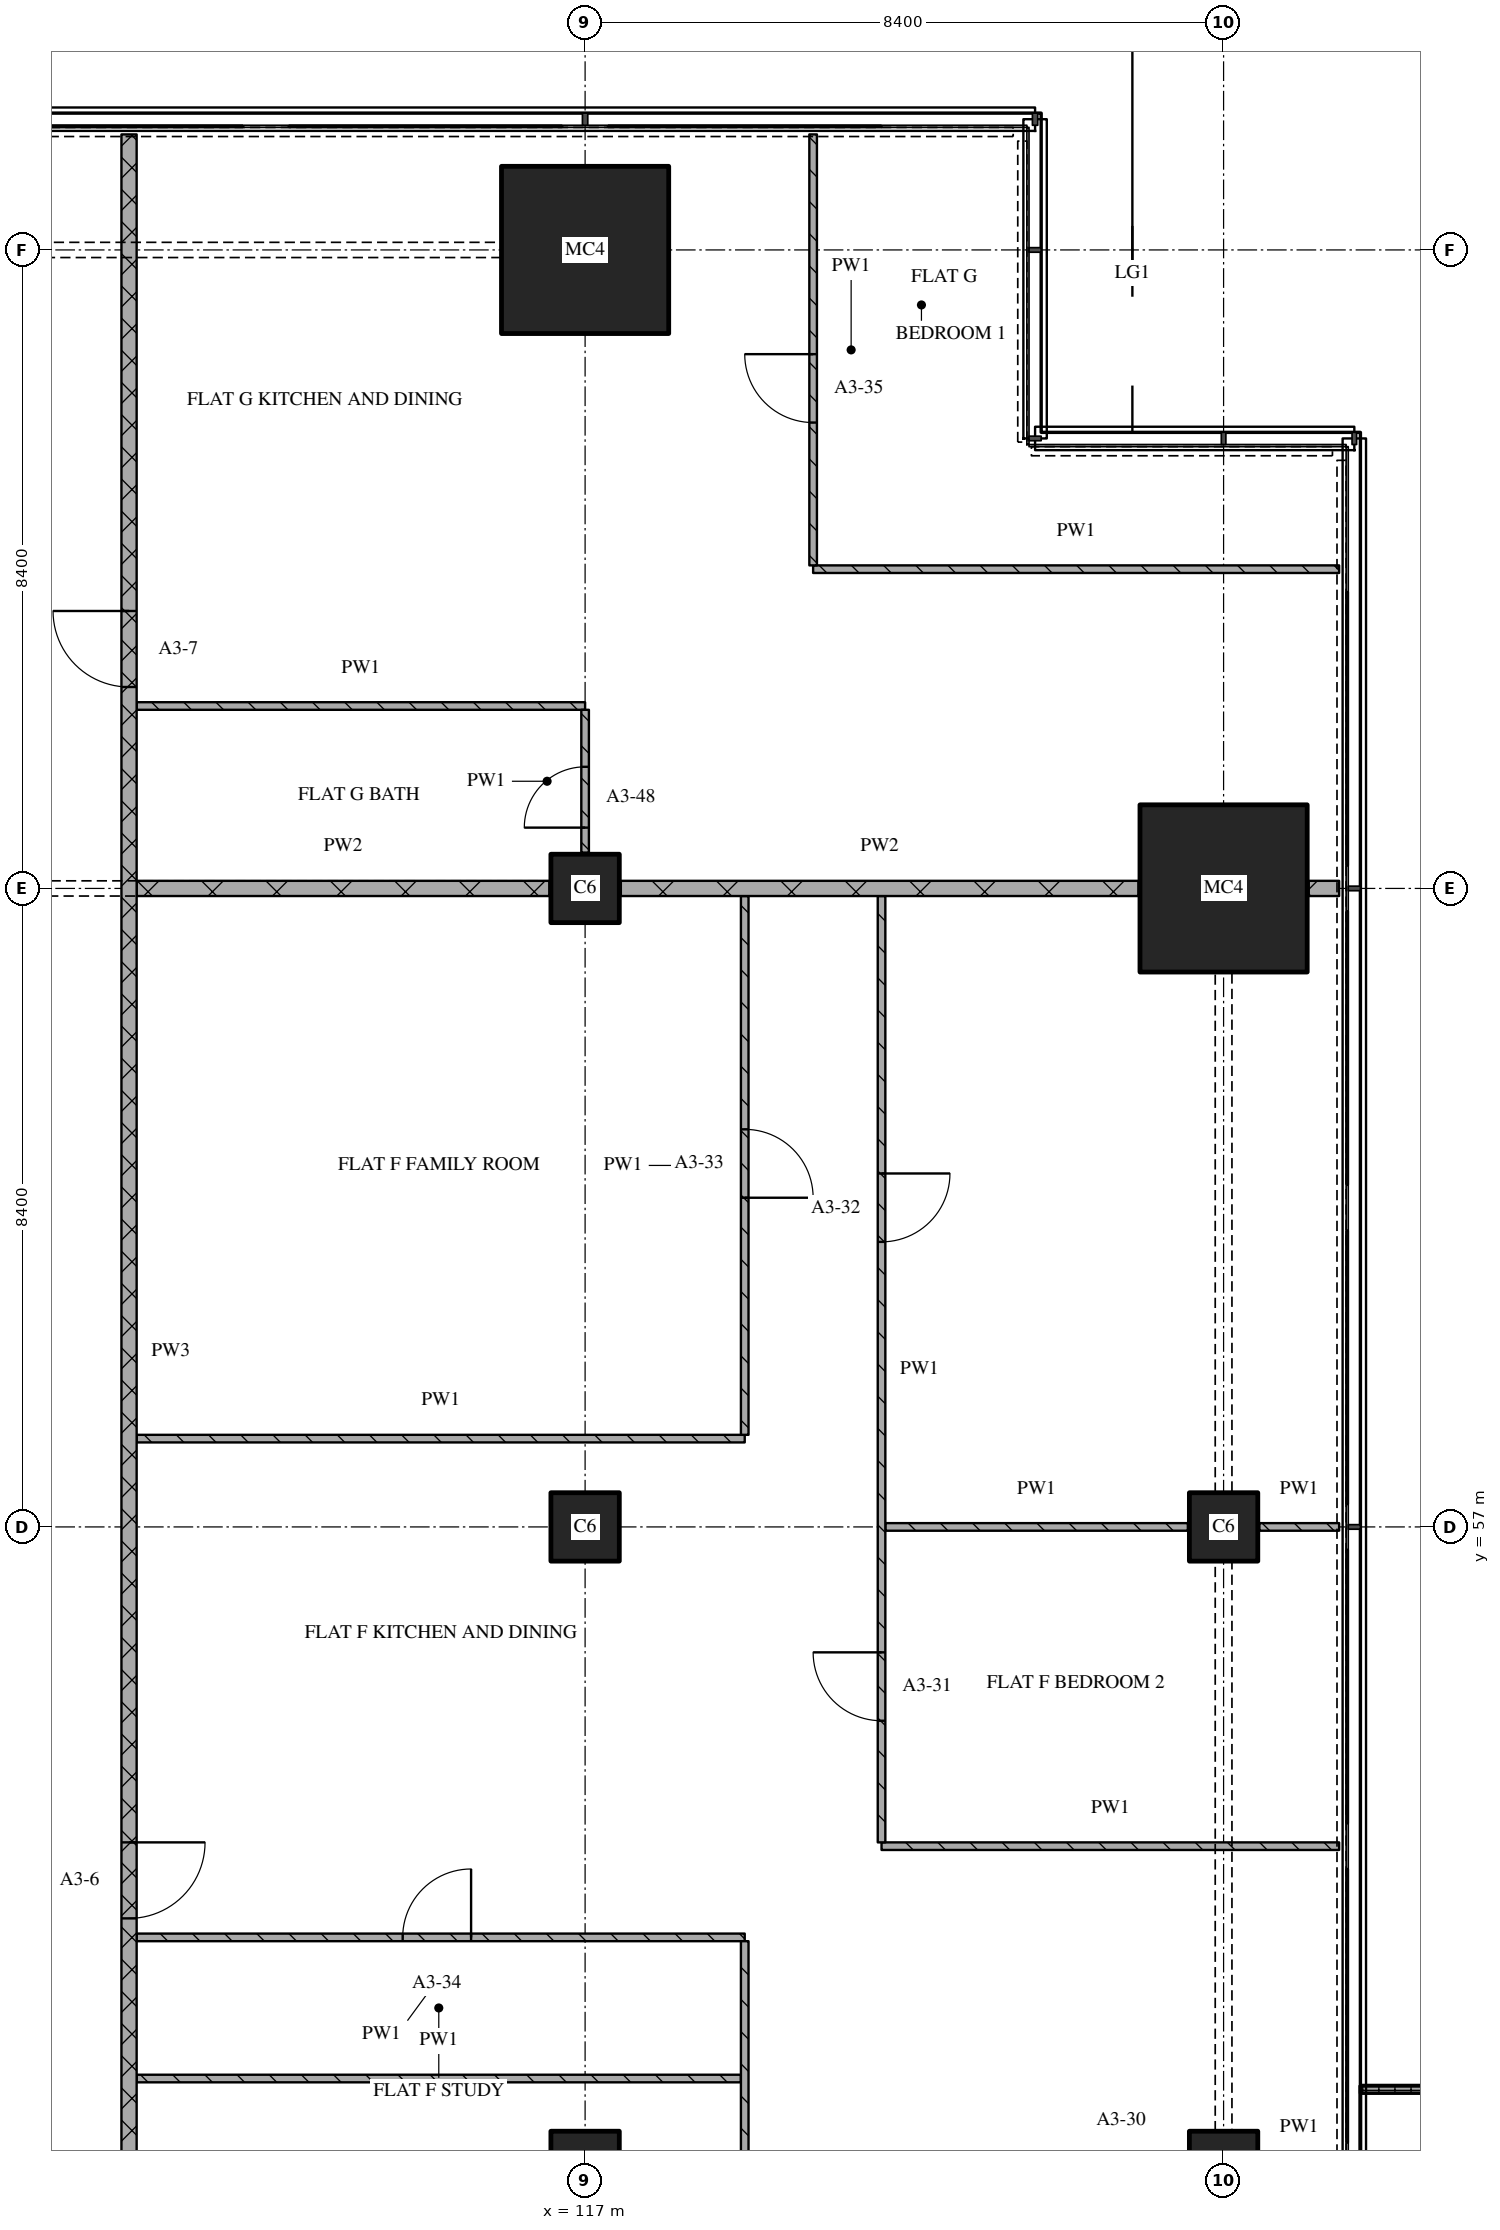
"""IFC4 building model, lengths in metres.
Left out: names, types, materials, properties, quantities, classifications, styles, units other than length and angle.
Written with IfcOpenShell. Run it as: python <this file> out.ifc"""

import sys

from ifc_helpers import new_model, si_unit, direction, frame, frame_2d, origin, origin_2d, place, context, subcontext, project, spatial, polyline, rectangle, outline, extrude, element, fill, save


model = new_model("IFC4")
c1 = context("Model", 3, precision=1e-05, world=origin(), true_north=direction((0.0, 1.0)))
c2 = subcontext(c1, "Body", "Model", "MODEL_VIEW")
j1 = project(units=[si_unit("LENGTHUNIT", "METRE"), si_unit("PLANEANGLEUNIT", "RADIAN")], contexts=[c1])
p1 = place(None, origin())
s1 = spatial("IfcSite", under=j1, at=p1, CompositionType="ELEMENT")
p2 = place(p1, origin())
s2 = spatial("IfcBuilding", under=s1, at=p2, CompositionType="ELEMENT")
p3 = place(p2, frame((0.0, 0.0, 58.8)))
s3 = spatial("IfcBuildingStorey", under=s2, at=p3, CompositionType="ELEMENT", Elevation=58.8)
for number, where, z_axis, x_axis in (
    (1, (117.0, 48.6, 0.0), (0.0, 0.0, 1.0), (1.0, 0.0, 0.0)),
    (2, (117.0, 57.0, 0.0), (0.0, 0.0, 1.0), (1.0, 0.0, 0.0)),
    (3, (117.0, 65.4, 0.0), (0.0, 0.0, 1.0), (1.0, 0.0, 0.0)),
):
    element("IfcColumn", number, at=place(p3, frame(where, z_axis=z_axis, x_axis=x_axis)), inside=s3, PredefinedType="COLUMN", context=c2, shape_type="SweptSolid", body=[
        extrude(rectangle(XDim=0.9, YDim=0.9, at=origin_2d()), origin(), (0.0, 0.0, 1.0), 3.6),
    ])
p4 = place(p3, frame((117.0, 73.8, 0.0), z_axis=(0.0, 0.0, 1.0), x_axis=(1.0, 0.0, 0.0)))
e4 = element("IfcColumn", 4, at=p4, inside=s3, PredefinedType="COLUMN", context=c2, shape_type="SweptSolid", body=[
    extrude(rectangle(XDim=2.2, YDim=2.2, at=origin_2d()), origin(), (0.0, 0.0, 1.0), 3.6),
])
for number, where, z_axis, x_axis in (
    (5, (125.4, 48.6, 0.0), (0.0, 0.0, 1.0), (1.0, 0.0, 0.0)),
    (6, (125.4, 57.0, 0.0), (0.0, 0.0, 1.0), (1.0, 0.0, 0.0)),
):
    element("IfcColumn", number, at=place(p3, frame(where, z_axis=z_axis, x_axis=x_axis)), inside=s3, PredefinedType="COLUMN", context=c2, shape_type="SweptSolid", body=[
        extrude(rectangle(XDim=0.9, YDim=0.9, at=origin_2d()), origin(), (0.0, 0.0, 1.0), 3.6),
    ])
p5 = place(p3, frame((125.4, 65.4, 0.0), z_axis=(0.0, 0.0, 1.0), x_axis=(1.0, 0.0, 0.0)))
e7 = element("IfcColumn", 7, at=p5, inside=s3, PredefinedType="COLUMN", context=c2, shape_type="SweptSolid", body=[
    extrude(rectangle(XDim=2.2, YDim=2.2, at=origin_2d()), origin(), (0.0, 0.0, 1.0), 3.6),
])
p6 = place(p3, origin())
e8 = element("IfcWall", 8, at=p6, inside=s3, PredefinedType="SOLIDWALL", context=c2, shape_type="SweptSolid", body=[
    extrude(outline(polyline([(127.2, 43.35), (127.2, 43.45), (128.967, 43.45), (128.967, 49.55), (127.2, 49.55), (127.2, 49.65), (129.067, 49.65), (129.067, 43.35), (127.2, 43.35)])), origin(), (0.0, 0.0, 1.0), 1.0),
])
p7 = place(p3, frame((111.1, 49.743, 0.0), z_axis=(0.0, 0.0, 1.0), x_axis=(1.0, 0.0, 0.0)))
e9 = element("IfcWall", 9, at=p7, inside=s3, PredefinedType="PARTITIONING", context=c2, shape_type="SweptSolid", body=[
    extrude(rectangle(XDim=7.95, YDim=0.1, at=frame_2d((3.975, 0.0))), origin(), (0.0, 0.0, 1.0), 3.32),
])
p8 = place(p3, frame((119.1, 51.6, 0.0), z_axis=(0.0, 0.0, 1.0), x_axis=(-1.0, 0.0, 0.0)))
e10 = element("IfcWall", 10, at=p8, inside=s3, PredefinedType="PARTITIONING", context=c2, shape_type="SweptSolid", body=[
    extrude(rectangle(XDim=8.0, YDim=0.1, at=frame_2d((4.0, 0.0))), origin(), (0.0, 0.0, 1.0), 3.32),
])
p9 = place(p8, frame((3.6, 0.0, 0.0)))
e11 = element("IfcOpeningElement", 11, at=p9, cuts=e10, PredefinedType="OPENING", context=c2, shape_type="SweptSolid", body=[
    extrude(rectangle(XDim=0.9, YDim=2.1, at=frame_2d((0.45, 1.05))), frame((0.0, 0.06, 0.0), z_axis=(0.0, -1.0, 0.0), x_axis=(1.0, 0.0, 0.0)), (0.0, 0.0, 1.0), 0.12),
])
p10 = place(p3, frame((120.9, 52.8, 0.0), z_axis=(0.0, 0.0, 1.0), x_axis=(1.0, 0.0, 0.0)))
e12 = element("IfcWall", 12, at=p10, inside=s3, PredefinedType="PARTITIONING", context=c2, shape_type="SweptSolid", body=[
    extrude(rectangle(XDim=6.02, YDim=0.1, at=frame_2d((3.01, 0.0))), origin(), (0.0, 0.0, 1.0), 3.32),
])
p11 = place(p3, frame((120.95, 57.0, 0.0), z_axis=(0.0, 0.0, 1.0), x_axis=(1.0, 0.0, 0.0)))
e13 = element("IfcWall", 13, at=p11, inside=s3, PredefinedType="PARTITIONING", context=c2, shape_type="SweptSolid", body=[
    extrude(rectangle(XDim=3.98, YDim=0.1, at=frame_2d((1.99, 0.0))), origin(), (0.0, 0.0, 1.0), 3.32),
])
p12 = place(p3, frame((125.87, 57.0, 0.0), z_axis=(0.0, 0.0, 1.0), x_axis=(1.0, 0.0, 0.0)))
e14 = element("IfcWall", 14, at=p12, inside=s3, PredefinedType="PARTITIONING", context=c2, shape_type="SweptSolid", body=[
    extrude(rectangle(XDim=1.05, YDim=0.1, at=frame_2d((0.525, 0.0))), origin(), (0.0, 0.0, 1.0), 3.32),
])
p13 = place(p3, frame((111.1, 58.162, 0.0), z_axis=(0.0, 0.0, 1.0), x_axis=(1.0, 0.0, 0.0)))
e15 = element("IfcWall", 15, at=p13, inside=s3, PredefinedType="PARTITIONING", context=c2, shape_type="SweptSolid", body=[
    extrude(rectangle(XDim=8.0, YDim=0.1, at=frame_2d((4.0, 0.0))), origin(), (0.0, 0.0, 1.0), 3.32),
])
p14 = place(p3, frame((111.1, 65.4, 0.0), z_axis=(0.0, 0.0, 1.0), x_axis=(1.0, 0.0, 0.0)))
e16 = element("IfcWall", 16, at=p14, inside=s3, PredefinedType="PARTITIONING", context=c2, shape_type="SweptSolid", body=[
    extrude(rectangle(XDim=5.43, YDim=0.2, at=frame_2d((2.715, 0.0))), origin(), (0.0, 0.0, 1.0), 2.82),
])
p15 = place(p3, frame((117.47, 65.4, 0.0), z_axis=(0.0, 0.0, 1.0), x_axis=(1.0, 0.0, 0.0)))
e17 = element("IfcWall", 17, at=p15, inside=s3, PredefinedType="PARTITIONING", context=c2, shape_type="SweptSolid", body=[
    extrude(rectangle(XDim=6.81, YDim=0.2, at=frame_2d((3.405, 0.0))), origin(), (0.0, 0.0, 1.0), 3.32),
])
p16 = place(p3, frame((126.52, 65.4, 0.0), z_axis=(0.0, 0.0, 1.0), x_axis=(1.0, 0.0, 0.0)))
e18 = element("IfcWall", 18, at=p16, inside=s3, PredefinedType="PARTITIONING", context=c2, shape_type="SweptSolid", body=[
    extrude(rectangle(XDim=0.4, YDim=0.2, at=frame_2d((0.2, 0.0))), origin(), (0.0, 0.0, 1.0), 3.32),
])
p17 = place(p3, frame((111.1, 67.8, 0.0), z_axis=(0.0, 0.0, 1.0), x_axis=(1.0, 0.0, 0.0)))
e19 = element("IfcWall", 19, at=p17, inside=s3, PredefinedType="PARTITIONING", context=c2, shape_type="SweptSolid", body=[
    extrude(rectangle(XDim=5.9, YDim=0.1, at=frame_2d((2.95, 0.0))), origin(), (0.0, 0.0, 1.0), 3.32),
])
p18 = place(p3, frame((120.0, 69.6, 0.0), z_axis=(0.0, 0.0, 1.0), x_axis=(1.0, 0.0, 0.0)))
e20 = element("IfcWall", 20, at=p18, inside=s3, PredefinedType="PARTITIONING", context=c2, shape_type="SweptSolid", body=[
    extrude(rectangle(XDim=6.92, YDim=0.1, at=frame_2d((3.46, 0.0))), origin(), (0.0, 0.0, 1.0), 3.32),
])
p19 = place(p3, frame((111.0, 75.32, 0.0), z_axis=(0.0, 0.0, 1.0), x_axis=(0.0, -1.0, 0.0)))
e21 = element("IfcWall", 21, at=p19, inside=s3, PredefinedType="PARTITIONING", context=c2, shape_type="SweptSolid", body=[
    extrude(rectangle(XDim=32.02, YDim=0.2, at=frame_2d((16.01, 0.0))), origin(), (0.0, 0.0, 1.0), 3.32),
])
p20 = place(p19, frame((6.27, 0.0, 0.0)))
e22 = element("IfcOpeningElement", 22, at=p20, cuts=e21, PredefinedType="OPENING", context=c2, shape_type="SweptSolid", body=[
    extrude(rectangle(XDim=1.0, YDim=2.1, at=frame_2d((0.5, 1.05))), frame((0.0, 0.11, 0.0), z_axis=(0.0, -1.0, 0.0), x_axis=(1.0, 0.0, 0.0)), (0.0, 0.0, 1.0), 0.22),
])
p21 = place(p19, frame((22.47, 0.0, 0.0)))
e23 = element("IfcOpeningElement", 23, at=p21, cuts=e21, PredefinedType="OPENING", context=c2, shape_type="SweptSolid", body=[
    extrude(rectangle(XDim=1.0, YDim=2.1, at=frame_2d((0.5, 1.05))), frame((0.0, 0.11, 0.0), z_axis=(0.0, -1.0, 0.0), x_axis=(1.0, 0.0, 0.0)), (0.0, 0.0, 1.0), 0.22),
])
p22 = place(p3, frame((117.0, 65.87, 0.0), z_axis=(0.0, 0.0, 1.0), x_axis=(0.0, 1.0, 0.0)))
e24 = element("IfcWall", 24, at=p22, inside=s3, PredefinedType="PARTITIONING", context=c2, shape_type="SweptSolid", body=[
    extrude(rectangle(XDim=1.88, YDim=0.1, at=frame_2d((0.94, 0.0))), origin(), (0.0, 0.0, 1.0), 3.32),
])
p23 = place(p22, frame((0.33, 0.0, 0.0)))
e25 = element("IfcOpeningElement", 25, at=p23, cuts=e24, PredefinedType="OPENING", context=c2, shape_type="SweptSolid", body=[
    extrude(rectangle(XDim=0.8, YDim=2.1, at=frame_2d((0.4, 1.05))), frame((0.0, 0.06, 0.0), z_axis=(0.0, -1.0, 0.0), x_axis=(1.0, 0.0, 0.0)), (0.0, 0.0, 1.0), 0.12),
])
p24 = place(p3, frame((119.1, 43.3, 0.0), z_axis=(0.0, 0.0, 1.0), x_axis=(0.0, 1.0, 0.0)))
e26 = element("IfcWall", 26, at=p24, inside=s3, PredefinedType="PARTITIONING", context=c2, shape_type="SweptSolid", body=[
    extrude(rectangle(XDim=8.25, YDim=0.1, at=frame_2d((4.125, 0.0))), origin(), (0.0, 0.0, 1.0), 3.32),
])
p25 = place(p24, frame((1.136, 0.0, 0.0)))
e27 = element("IfcOpeningElement", 27, at=p25, cuts=e26, PredefinedType="OPENING", context=c2, shape_type="SweptSolid", body=[
    extrude(rectangle(XDim=0.8, YDim=2.1, at=frame_2d((0.4, 1.05))), frame((0.0, 0.06, 0.0), z_axis=(0.0, -1.0, 0.0), x_axis=(1.0, 0.0, 0.0)), (0.0, 0.0, 1.0), 0.12),
])
p26 = place(p24, frame((4.407, 0.0, 0.0)))
e28 = element("IfcOpeningElement", 28, at=p26, cuts=e26, PredefinedType="OPENING", context=c2, shape_type="SweptSolid", body=[
    extrude(rectangle(XDim=0.8, YDim=2.1, at=frame_2d((0.4, 1.05))), frame((0.0, 0.06, 0.0), z_axis=(0.0, -1.0, 0.0), x_axis=(1.0, 0.0, 0.0)), (0.0, 0.0, 1.0), 0.12),
])
p27 = place(p3, frame((119.1, 58.212, 0.0), z_axis=(0.0, 0.0, 1.0), x_axis=(0.0, 1.0, 0.0)))
e29 = element("IfcWall", 29, at=p27, inside=s3, PredefinedType="PARTITIONING", context=c2, shape_type="SweptSolid", body=[
    extrude(rectangle(XDim=7.088, YDim=0.1, at=frame_2d((3.544, 0.0))), origin(), (0.0, 0.0, 1.0), 3.32),
])
p28 = place(p27, frame((3.119, 0.0, 0.0)))
e30 = element("IfcOpeningElement", 30, at=p28, cuts=e29, PredefinedType="OPENING", context=c2, shape_type="SweptSolid", body=[
    extrude(rectangle(XDim=0.9, YDim=2.1, at=frame_2d((0.45, 1.05))), frame((0.0, 0.06, 0.0), z_axis=(0.0, -1.0, 0.0), x_axis=(1.0, 0.0, 0.0)), (0.0, 0.0, 1.0), 0.12),
])
p29 = place(p3, frame((120.0, 75.32, 0.0), z_axis=(0.0, 0.0, 1.0), x_axis=(0.0, -1.0, 0.0)))
e31 = element("IfcWall", 31, at=p29, inside=s3, PredefinedType="PARTITIONING", context=c2, shape_type="SweptSolid", body=[
    extrude(rectangle(XDim=5.67, YDim=0.1, at=frame_2d((2.835, 0.0))), origin(), (0.0, 0.0, 1.0), 3.32),
])
p30 = place(p29, frame((2.891, 0.0, 0.0)))
e32 = element("IfcOpeningElement", 32, at=p30, cuts=e31, PredefinedType="OPENING", context=c2, shape_type="SweptSolid", body=[
    extrude(rectangle(XDim=0.9, YDim=2.1, at=frame_2d((0.45, 1.05))), frame((0.0, 0.06, 0.0), z_axis=(0.0, -1.0, 0.0), x_axis=(1.0, 0.0, 0.0)), (0.0, 0.0, 1.0), 0.12),
])
p31 = place(p3, frame((120.9, 65.3, 0.0), z_axis=(0.0, 0.0, 1.0), x_axis=(0.0, -1.0, 0.0)))
e33 = element("IfcWall", 33, at=p31, inside=s3, PredefinedType="PARTITIONING", context=c2, shape_type="SweptSolid", body=[
    extrude(rectangle(XDim=12.45, YDim=0.1, at=frame_2d((6.225, 0.0))), origin(), (0.0, 0.0, 1.0), 3.32),
])
p32 = place(p31, frame((3.65, 0.0, 0.0)))
e34 = element("IfcOpeningElement", 34, at=p32, cuts=e33, PredefinedType="OPENING", context=c2, shape_type="SweptSolid", body=[
    extrude(rectangle(XDim=0.9, YDim=2.1, at=frame_2d((0.45, 1.05))), frame((0.0, 0.06, 0.0), z_axis=(0.0, -1.0, 0.0), x_axis=(1.0, 0.0, 0.0)), (0.0, 0.0, 1.0), 0.12),
])
p33 = place(p31, frame((9.95, 0.0, 0.0)))
e35 = element("IfcOpeningElement", 35, at=p33, cuts=e33, PredefinedType="OPENING", context=c2, shape_type="SweptSolid", body=[
    extrude(rectangle(XDim=0.9, YDim=2.1, at=frame_2d((0.45, 1.05))), frame((0.0, 0.06, 0.0), z_axis=(0.0, -1.0, 0.0), x_axis=(1.0, 0.0, 0.0)), (0.0, 0.0, 1.0), 0.12),
])
p34 = place(p9, origin())
e36 = element("IfcDoor", 36, at=p34, inside=s3, OperationType="SINGLE_SWING_RIGHT", PredefinedType="DOOR", context=c2, shape_type="SweptSolid", body=[
    extrude(rectangle(XDim=0.9, YDim=2.1, at=frame_2d((0.45, 1.05))), frame((0.0, 0.025, 0.0), z_axis=(0.0, -1.0, 0.0), x_axis=(1.0, 0.0, 0.0)), (0.0, 0.0, 1.0), 0.05),
])
fill(e11, e36)
p35 = place(p20, origin())
e37 = element("IfcDoor", 37, at=p35, inside=s3, OperationType="SINGLE_SWING_RIGHT", PredefinedType="DOOR", context=c2, shape_type="SweptSolid", body=[
    extrude(rectangle(XDim=1.0, YDim=2.1, at=frame_2d((0.5, 1.05))), frame((0.0, 0.025, 0.0), z_axis=(0.0, -1.0, 0.0), x_axis=(1.0, 0.0, 0.0)), (0.0, 0.0, 1.0), 0.05),
])
fill(e22, e37)
p36 = place(p21, origin())
e38 = element("IfcDoor", 38, at=p36, inside=s3, OperationType="SINGLE_SWING_LEFT", PredefinedType="DOOR", context=c2, shape_type="SweptSolid", body=[
    extrude(rectangle(XDim=1.0, YDim=2.1, at=frame_2d((0.5, 1.05))), frame((0.0, 0.025, 0.0), z_axis=(0.0, -1.0, 0.0), x_axis=(1.0, 0.0, 0.0)), (0.0, 0.0, 1.0), 0.05),
])
fill(e23, e38)
p37 = place(p23, origin())
e39 = element("IfcDoor", 39, at=p37, inside=s3, OperationType="SINGLE_SWING_LEFT", PredefinedType="DOOR", context=c2, shape_type="SweptSolid", body=[
    extrude(rectangle(XDim=0.8, YDim=2.1, at=frame_2d((0.4, 1.05))), frame((0.0, 0.025, 0.0), z_axis=(0.0, -1.0, 0.0), x_axis=(1.0, 0.0, 0.0)), (0.0, 0.0, 1.0), 0.05),
])
fill(e25, e39)
p38 = place(p28, origin())
e40 = element("IfcDoor", 40, at=p38, inside=s3, OperationType="SINGLE_SWING_RIGHT", PredefinedType="DOOR", context=c2, shape_type="SweptSolid", body=[
    extrude(rectangle(XDim=0.9, YDim=2.1, at=frame_2d((0.45, 1.05))), frame((0.0, 0.025, 0.0), z_axis=(0.0, -1.0, 0.0), x_axis=(1.0, 0.0, 0.0)), (0.0, 0.0, 1.0), 0.05),
])
fill(e30, e40)
p39 = place(p30, origin())
e41 = element("IfcDoor", 41, at=p39, inside=s3, OperationType="SINGLE_SWING_RIGHT", PredefinedType="DOOR", context=c2, shape_type="SweptSolid", body=[
    extrude(rectangle(XDim=0.9, YDim=2.1, at=frame_2d((0.45, 1.05))), frame((0.0, 0.025, 0.0), z_axis=(0.0, -1.0, 0.0), x_axis=(1.0, 0.0, 0.0)), (0.0, 0.0, 1.0), 0.05),
])
fill(e32, e41)
p40 = place(p32, origin())
e42 = element("IfcDoor", 42, at=p40, inside=s3, OperationType="SINGLE_SWING_LEFT", PredefinedType="DOOR", context=c2, shape_type="SweptSolid", body=[
    extrude(rectangle(XDim=0.9, YDim=2.1, at=frame_2d((0.45, 1.05))), frame((0.0, 0.025, 0.0), z_axis=(0.0, -1.0, 0.0), x_axis=(1.0, 0.0, 0.0)), (0.0, 0.0, 1.0), 0.05),
])
fill(e34, e42)
p41 = place(p33, origin())
e43 = element("IfcDoor", 43, at=p41, inside=s3, OperationType="SINGLE_SWING_RIGHT", PredefinedType="DOOR", context=c2, shape_type="SweptSolid", body=[
    extrude(rectangle(XDim=0.9, YDim=2.1, at=frame_2d((0.45, 1.05))), frame((0.0, 0.025, 0.0), z_axis=(0.0, -1.0, 0.0), x_axis=(1.0, 0.0, 0.0)), (0.0, 0.0, 1.0), 0.05),
])
fill(e35, e43)
save(model, sys.argv[1])
